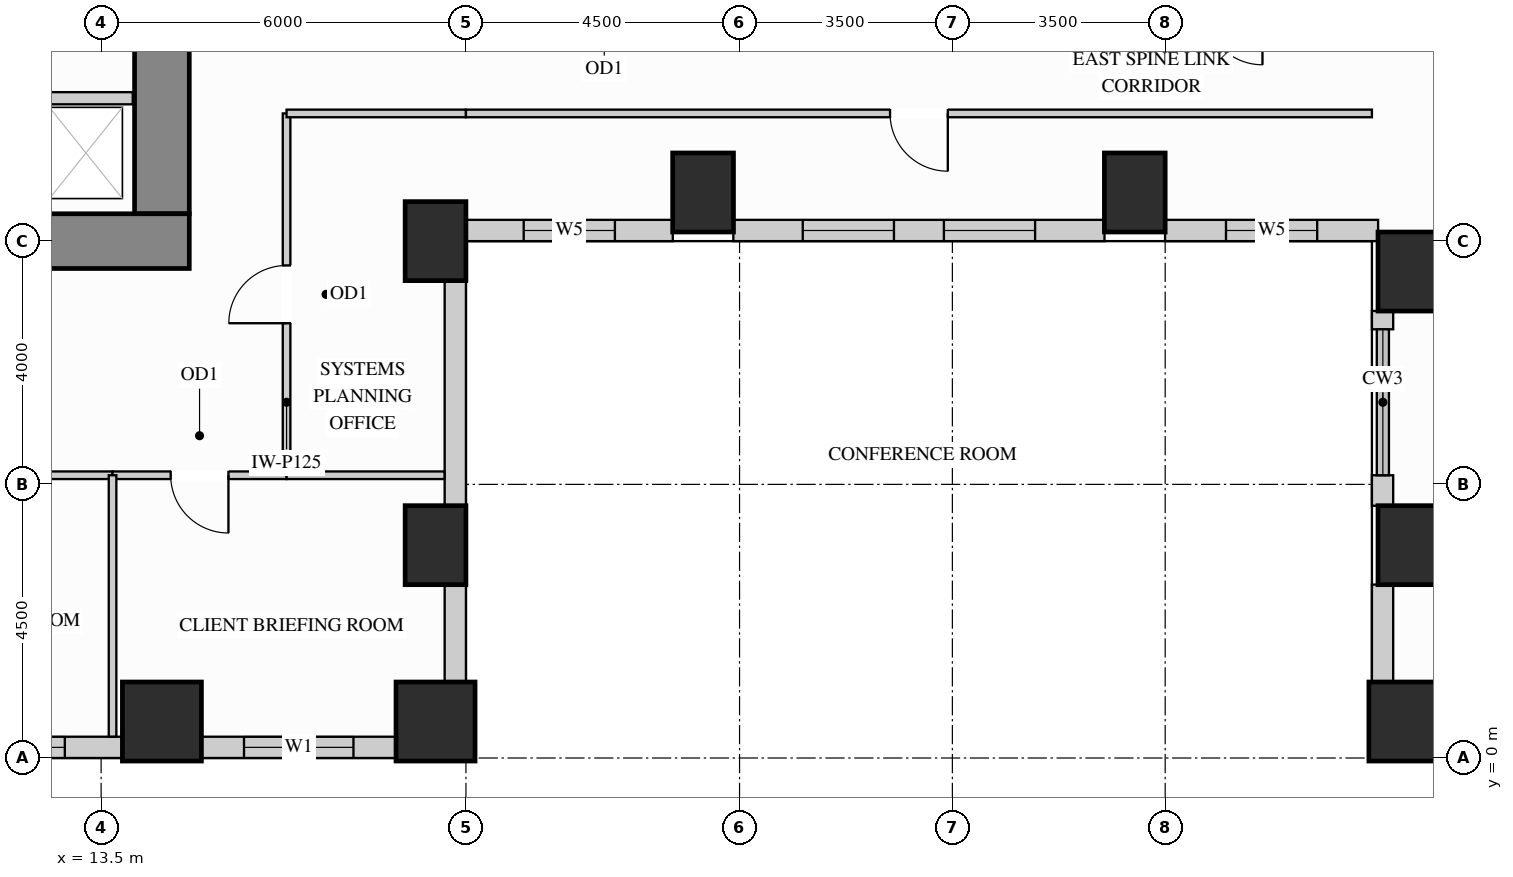
"""IFC4 building model, lengths in metres.
Left out: names, types, materials, properties, quantities, classifications, styles, units other than length and angle.
Written with IfcOpenShell. Run it as: python <this file> out.ifc"""

import sys

from ifc_helpers import new_model, si_unit, direction, frame, frame_2d, origin, origin_2d, place, context, subcontext, project, spatial, rectangle, extrude, source, transform, mapped, element, fill, save


model = new_model("IFC4")
c1 = context("Model", 3, precision=1e-05, world=origin(), true_north=direction((0.0, 1.0)))
c2 = subcontext(c1, "Body", "Model", "MODEL_VIEW")
j1 = project(units=[si_unit("LENGTHUNIT", "METRE"), si_unit("PLANEANGLEUNIT", "RADIAN")], contexts=[c1])
p1 = place(None, origin())
s1 = spatial("IfcSite", under=j1, at=p1, CompositionType="ELEMENT")
p2 = place(p1, origin())
s2 = spatial("IfcBuilding", under=s1, at=p2, CompositionType="ELEMENT")
p3 = place(p2, frame((0.0, 0.0, 44.1)))
s3 = spatial("IfcBuildingStorey", under=s2, at=p3, CompositionType="ELEMENT", Elevation=44.1)
m1 = source(origin(), c2, "Body", "SweptSolid", [
    extrude(rectangle(XDim=1.0, YDim=1.3, at=origin_2d()), origin(), (0.0, 0.0, 1.0), 3.38),
])
for number, where, z_axis, x_axis in (
    (1, (19.0, 3.5, 0.0), (0.0, 0.0, 1.0), (1.0, 0.0, 0.0)),
    (2, (19.0, 8.5, 0.0), (0.0, 0.0, 1.0), (1.0, 0.0, 0.0)),
    (3, (35.0, 3.5, 0.0), (0.0, 0.0, 1.0), (1.0, 0.0, 0.0)),
    (4, (35.0, 8.0, 0.0), (0.0, 0.0, 1.0), (1.0, 0.0, 0.0)),
    (5, (23.4, 9.3, 0.0), (0.0, 0.0, 1.0), (1.0, 0.0, 0.0)),
    (6, (30.5, 9.3, 0.0), (0.0, 0.0, 1.0), (1.0, 0.0, 0.0)),
):
    element("IfcColumn", number, at=place(p3, frame(where, z_axis=z_axis, x_axis=x_axis)), inside=s3, PredefinedType="COLUMN", context=c2, shape_type="MappedRepresentation", body=[
        mapped(m1, transform((0.0, 0.0, 0.0), x_axis=(1.0, 0.0, 0.0), y_axis=(0.0, 1.0, 0.0), z_axis=(0.0, 0.0, 1.0))),
    ])
m2 = source(origin(), c2, "Body", "SweptSolid", [
    extrude(rectangle(XDim=1.3, YDim=1.3, at=origin_2d()), origin(), (0.0, 0.0, 1.0), 3.38),
])
for number, where, z_axis, x_axis in (
    (7, (14.5, 0.6, 0.0), (0.0, 0.0, 1.0), (1.0, 0.0, 0.0)),
    (8, (19.0, 0.6, 0.0), (0.0, 0.0, 1.0), (1.0, 0.0, 0.0)),
    (9, (35.0, 0.6, 0.0), (0.0, 0.0, 1.0), (1.0, 0.0, 0.0)),
):
    element("IfcColumn", number, at=place(p3, frame(where, z_axis=z_axis, x_axis=x_axis)), inside=s3, PredefinedType="COLUMN", context=c2, shape_type="MappedRepresentation", body=[
        mapped(m2, transform((0.0, 0.0, 0.0), x_axis=(1.0, 0.0, 0.0), y_axis=(0.0, 1.0, 0.0), z_axis=(0.0, 0.0, 1.0))),
    ])
m3 = source(origin(), c2, "Body", "SweptSolid", [
    extrude(rectangle(XDim=9.87, YDim=0.9, at=frame_2d((4.935, 0.0))), origin(), (0.0, 0.0, 1.0), 3.38),
])
p4 = place(p3, frame((14.5, 8.95, 0.0), z_axis=(0.0, 0.0, 1.0), x_axis=(0.0, 1.0, 0.0)))
e10 = element("IfcWall", 10, at=p4, inside=s3, PredefinedType="SHEAR", context=c2, shape_type="MappedRepresentation", body=[
    mapped(m3, transform((0.0, 0.0, 0.0), x_axis=(1.0, 0.0, 0.0), y_axis=(0.0, 1.0, 0.0), z_axis=(0.0, 0.0, 1.0))),
])
m4 = source(origin(), c2, "Body", "SweptSolid", [
    extrude(rectangle(XDim=10.9, YDim=0.9, at=frame_2d((5.45, 0.0))), origin(), (0.0, 0.0, 1.0), 3.38),
])
p5 = place(p3, frame((4.05, 8.5, 0.0), z_axis=(0.0, 0.0, 1.0), x_axis=(1.0, 0.0, 0.0)))
e11 = element("IfcWall", 11, at=p5, inside=s3, PredefinedType="SHEAR", context=c2, shape_type="MappedRepresentation", body=[
    mapped(m4, transform((0.0, 0.0, 0.0), x_axis=(1.0, 0.0, 0.0), y_axis=(0.0, 1.0, 0.0), z_axis=(0.0, 0.0, 1.0))),
])
p6 = place(p3, frame((9.648, 0.175, 0.0), z_axis=(0.0, 0.0, 1.0), x_axis=(1.0, 0.0, 0.0)))
e12 = element("IfcWall", 12, at=p6, inside=s3, PredefinedType="SOLIDWALL", context=c2, shape_type="SweptSolid", body=[
    extrude(rectangle(XDim=4.204, YDim=0.35, at=frame_2d((2.102, 0.0))), origin(), (0.0, 0.0, 1.0), 2.51),
])
p7 = place(p6, frame((0.855, 0.0, 0.78)))
e13 = element("IfcOpeningElement", 13, at=p7, cuts=e12, PredefinedType="OPENING", context=c2, shape_type="SweptSolid", body=[
    extrude(rectangle(XDim=2.4, YDim=1.55, at=frame_2d((1.2, 0.775))), frame((0.0, 0.185, 0.0), z_axis=(0.0, -1.0, 0.0), x_axis=(1.0, 0.0, 0.0)), (0.0, 0.0, 1.0), 0.37),
])
p8 = place(p3, frame((15.148, 0.175, 0.0), z_axis=(0.0, 0.0, 1.0), x_axis=(1.0, 0.0, 0.0)))
e14 = element("IfcWall", 14, at=p8, inside=s3, PredefinedType="SOLIDWALL", context=c2, shape_type="SweptSolid", body=[
    extrude(rectangle(XDim=3.204, YDim=0.35, at=frame_2d((1.602, 0.0))), origin(), (0.0, 0.0, 1.0), 2.51),
])
p9 = place(p8, frame((0.702, 0.0, 0.78)))
e15 = element("IfcOpeningElement", 15, at=p9, cuts=e14, PredefinedType="OPENING", context=c2, shape_type="SweptSolid", body=[
    extrude(rectangle(XDim=1.8, YDim=1.55, at=frame_2d((0.9, 0.775))), frame((0.0, 0.185, 0.0), z_axis=(0.0, -1.0, 0.0), x_axis=(1.0, 0.0, 0.0)), (0.0, 0.0, 1.0), 0.37),
])
m5 = source(origin(), c2, "Body", "SweptSolid", [
    extrude(rectangle(XDim=1.604, YDim=0.35, at=frame_2d((0.802, 0.0))), origin(), (0.0, 0.0, 1.0), 2.51),
])
p10 = place(p3, frame((19.325, 1.248, 0.0), z_axis=(0.0, 0.0, 1.0), x_axis=(0.0, 1.0, 0.0)))
e16 = element("IfcWall", 16, at=p10, inside=s3, PredefinedType="SOLIDWALL", context=c2, shape_type="MappedRepresentation", body=[
    mapped(m5, transform((0.0, 0.0, 0.0), x_axis=(1.0, 0.0, 0.0), y_axis=(0.0, 1.0, 0.0), z_axis=(0.0, 0.0, 1.0))),
])
m6 = source(origin(), c2, "Body", "SweptSolid", [
    extrude(rectangle(XDim=3.704, YDim=0.35, at=frame_2d((1.852, 0.0))), origin(), (0.0, 0.0, 1.0), 2.51),
])
p11 = place(p3, frame((19.325, 4.148, 0.0), z_axis=(0.0, 0.0, 1.0), x_axis=(0.0, 1.0, 0.0)))
e17 = element("IfcWall", 17, at=p11, inside=s3, PredefinedType="SOLIDWALL", context=c2, shape_type="MappedRepresentation", body=[
    mapped(m6, transform((0.0, 0.0, 0.0), x_axis=(1.0, 0.0, 0.0), y_axis=(0.0, 1.0, 0.0), z_axis=(0.0, 0.0, 1.0))),
])
p12 = place(p3, frame((19.498, 8.675, 0.0), z_axis=(0.0, 0.0, 1.0), x_axis=(1.0, 0.0, 0.0)))
e18 = element("IfcWall", 18, at=p12, inside=s3, PredefinedType="SOLIDWALL", context=c2, shape_type="SweptSolid", body=[
    extrude(rectangle(XDim=3.404, YDim=0.35, at=frame_2d((1.702, 0.0))), origin(), (0.0, 0.0, 1.0), 3.365),
])
p13 = place(p12, frame((0.952, 0.0, 0.78)))
e19 = element("IfcOpeningElement", 19, at=p13, cuts=e18, PredefinedType="OPENING", context=c2, shape_type="SweptSolid", body=[
    extrude(rectangle(XDim=1.5, YDim=2.0, at=frame_2d((0.75, 1.0))), frame((0.0, 0.185, 0.0), z_axis=(0.0, -1.0, 0.0), x_axis=(1.0, 0.0, 0.0)), (0.0, 0.0, 1.0), 0.37),
])
p14 = place(p3, frame((23.898, 8.675, 0.0), z_axis=(0.0, 0.0, 1.0), x_axis=(1.0, 0.0, 0.0)))
e20 = element("IfcWall", 20, at=p14, inside=s3, PredefinedType="SOLIDWALL", context=c2, shape_type="SweptSolid", body=[
    extrude(rectangle(XDim=6.104, YDim=0.35, at=frame_2d((3.052, 0.0))), origin(), (0.0, 0.0, 1.0), 3.365),
])
p15 = place(p14, frame((1.141, 0.0, 0.78)))
e21 = element("IfcOpeningElement", 21, at=p15, cuts=e20, PredefinedType="OPENING", context=c2, shape_type="SweptSolid", body=[
    extrude(rectangle(XDim=1.5, YDim=2.0, at=frame_2d((0.75, 1.0))), frame((0.0, 0.185, 0.0), z_axis=(0.0, -1.0, 0.0), x_axis=(1.0, 0.0, 0.0)), (0.0, 0.0, 1.0), 0.37),
])
p16 = place(p14, frame((3.463, 0.0, 0.78)))
e22 = element("IfcOpeningElement", 22, at=p16, cuts=e20, PredefinedType="OPENING", context=c2, shape_type="SweptSolid", body=[
    extrude(rectangle(XDim=1.5, YDim=2.0, at=frame_2d((0.75, 1.0))), frame((0.0, 0.185, 0.0), z_axis=(0.0, -1.0, 0.0), x_axis=(1.0, 0.0, 0.0)), (0.0, 0.0, 1.0), 0.37),
])
p17 = place(p3, frame((30.998, 8.675, 0.0), z_axis=(0.0, 0.0, 1.0), x_axis=(1.0, 0.0, 0.0)))
e23 = element("IfcWall", 23, at=p17, inside=s3, PredefinedType="SOLIDWALL", context=c2, shape_type="SweptSolid", body=[
    extrude(rectangle(XDim=3.504, YDim=0.35, at=frame_2d((1.752, 0.0))), origin(), (0.0, 0.0, 1.0), 3.365),
])
p18 = place(p17, frame((1.002, 0.0, 0.78)))
e24 = element("IfcOpeningElement", 24, at=p18, cuts=e23, PredefinedType="OPENING", context=c2, shape_type="SweptSolid", body=[
    extrude(rectangle(XDim=1.5, YDim=2.0, at=frame_2d((0.75, 1.0))), frame((0.0, 0.185, 0.0), z_axis=(0.0, -1.0, 0.0), x_axis=(1.0, 0.0, 0.0)), (0.0, 0.0, 1.0), 0.37),
])
m7 = source(origin(), c2, "Body", "SweptSolid", [
    extrude(rectangle(XDim=0.302, YDim=0.35, at=frame_2d((0.151, 0.0))), origin(), (0.0, 0.0, 1.0), 2.51),
])
p19 = place(p3, frame((34.575, 7.352, 0.0), z_axis=(0.0, 0.0, 1.0), x_axis=(0.0, -1.0, 0.0)))
e25 = element("IfcWall", 25, at=p19, inside=s3, PredefinedType="SOLIDWALL", context=c2, shape_type="MappedRepresentation", body=[
    mapped(m7, transform((0.0, 0.0, 0.0), x_axis=(1.0, 0.0, 0.0), y_axis=(0.0, 1.0, 0.0), z_axis=(0.0, 0.0, 1.0))),
])
m8 = source(origin(), c2, "Body", "SweptSolid", [
    extrude(rectangle(XDim=0.502, YDim=0.35, at=frame_2d((0.251, 0.0))), origin(), (0.0, 0.0, 1.0), 2.51),
])
p20 = place(p3, frame((34.575, 4.65, 0.0), z_axis=(0.0, 0.0, 1.0), x_axis=(0.0, -1.0, 0.0)))
e26 = element("IfcWall", 26, at=p20, inside=s3, PredefinedType="SOLIDWALL", context=c2, shape_type="MappedRepresentation", body=[
    mapped(m8, transform((0.0, 0.0, 0.0), x_axis=(1.0, 0.0, 0.0), y_axis=(0.0, 1.0, 0.0), z_axis=(0.0, 0.0, 1.0))),
])
p21 = place(p3, frame((34.575, 2.852, 0.0), z_axis=(0.0, 0.0, 1.0), x_axis=(0.0, -1.0, 0.0)))
e27 = element("IfcWall", 27, at=p21, inside=s3, PredefinedType="SOLIDWALL", context=c2, shape_type="MappedRepresentation", body=[
    mapped(m5, transform((0.0, 0.0, 0.0), x_axis=(1.0, 0.0, 0.0), y_axis=(0.0, 1.0, 0.0), z_axis=(0.0, 0.0, 1.0))),
])
p22 = place(p3, frame((16.55, 4.65, 0.0), z_axis=(0.0, 0.0, 1.0), x_axis=(0.0, 1.0, 0.0)))
e28 = element("IfcWall", 28, at=p22, inside=s3, PredefinedType="PARTITIONING", context=c2, shape_type="SweptSolid", body=[
    extrude(rectangle(XDim=5.95, YDim=0.125, at=frame_2d((2.975, 0.0))), origin(), (0.0, 0.0, 1.0), 3.365),
])
p23 = place(p22, frame((2.5, 0.0, 0.0)))
e29 = element("IfcOpeningElement", 29, at=p23, cuts=e28, PredefinedType="OPENING", context=c2, shape_type="SweptSolid", body=[
    extrude(rectangle(XDim=0.95, YDim=2.15, at=frame_2d((0.475, 1.075))), frame((0.0, 0.073, 0.0), z_axis=(0.0, -1.0, 0.0), x_axis=(1.0, 0.0, 0.0)), (0.0, 0.0, 1.0), 0.145),
])
m9 = source(origin(), c2, "Body", "SweptSolid", [
    extrude(rectangle(XDim=2.95, YDim=0.125, at=frame_2d((1.475, 0.0))), origin(), (0.0, 0.0, 1.0), 3.365),
])
p24 = place(p3, frame((16.55, 10.6, 0.0), z_axis=(0.0, 0.0, 1.0), x_axis=(1.0, 0.0, 0.0)))
e30 = element("IfcWall", 30, at=p24, inside=s3, PredefinedType="PARTITIONING", context=c2, shape_type="MappedRepresentation", body=[
    mapped(m9, transform((0.0, 0.0, 0.0), x_axis=(1.0, 0.0, 0.0), y_axis=(0.0, 1.0, 0.0), z_axis=(0.0, 0.0, 1.0))),
])
p25 = place(p3, frame((19.5, 10.6, 0.0), z_axis=(0.0, 0.0, 1.0), x_axis=(1.0, 0.0, 0.0)))
e31 = element("IfcWall", 31, at=p25, inside=s3, PredefinedType="PARTITIONING", context=c2, shape_type="SweptSolid", body=[
    extrude(rectangle(XDim=14.9, YDim=0.125, at=frame_2d((7.45, 0.0))), origin(), (0.0, 0.0, 1.0), 3.365),
])
p26 = place(p25, frame((6.975, 0.0, 0.0)))
e32 = element("IfcOpeningElement", 32, at=p26, cuts=e31, PredefinedType="OPENING", context=c2, shape_type="SweptSolid", body=[
    extrude(rectangle(XDim=0.95, YDim=2.15, at=frame_2d((0.475, 1.075))), frame((0.0, 0.073, 0.0), z_axis=(0.0, -1.0, 0.0), x_axis=(1.0, 0.0, 0.0)), (0.0, 0.0, 1.0), 0.145),
])
p27 = place(p3, frame((7.896, 4.65, 0.0), z_axis=(0.0, 0.0, 1.0), x_axis=(1.0, 0.0, 0.0)))
e33 = element("IfcWall", 33, at=p27, inside=s3, PredefinedType="PARTITIONING", context=c2, shape_type="SweptSolid", body=[
    extrude(rectangle(XDim=5.792, YDim=0.125, at=frame_2d((2.896, 0.0))), origin(), (0.0, 0.0, 1.0), 2.828),
])
p28 = place(p27, frame((2.421, 0.0, 0.0)))
e34 = element("IfcOpeningElement", 34, at=p28, cuts=e33, PredefinedType="OPENING", context=c2, shape_type="SweptSolid", body=[
    extrude(rectangle(XDim=0.95, YDim=2.15, at=frame_2d((0.475, 1.075))), frame((0.0, 0.073, 0.0), z_axis=(0.0, -1.0, 0.0), x_axis=(1.0, 0.0, 0.0)), (0.0, 0.0, 1.0), 0.145),
])
p29 = place(p3, frame((13.688, 4.65, 0.0), z_axis=(0.0, 0.0, 1.0), x_axis=(1.0, 0.0, 0.0)))
e35 = element("IfcWall", 35, at=p29, inside=s3, PredefinedType="PARTITIONING", context=c2, shape_type="SweptSolid", body=[
    extrude(rectangle(XDim=2.862, YDim=0.125, at=frame_2d((1.431, 0.0))), origin(), (0.0, 0.0, 1.0), 2.828),
])
p30 = place(p29, frame((0.956, 0.0, 0.0)))
e36 = element("IfcOpeningElement", 36, at=p30, cuts=e35, PredefinedType="OPENING", context=c2, shape_type="SweptSolid", body=[
    extrude(rectangle(XDim=0.95, YDim=2.15, at=frame_2d((0.475, 1.075))), frame((0.0, 0.073, 0.0), z_axis=(0.0, -1.0, 0.0), x_axis=(1.0, 0.0, 0.0)), (0.0, 0.0, 1.0), 0.145),
])
m10 = source(origin(), c2, "Body", "SweptSolid", [
    extrude(rectangle(XDim=2.598, YDim=0.125, at=frame_2d((1.299, 0.0))), origin(), (0.0, 0.0, 1.0), 2.828),
])
p31 = place(p3, frame((16.55, 4.65, 0.0), z_axis=(0.0, 0.0, 1.0), x_axis=(1.0, 0.0, 0.0)))
e37 = element("IfcWall", 37, at=p31, inside=s3, PredefinedType="PARTITIONING", context=c2, shape_type="MappedRepresentation", body=[
    mapped(m10, transform((0.0, 0.0, 0.0), x_axis=(1.0, 0.0, 0.0), y_axis=(0.0, 1.0, 0.0), z_axis=(0.0, 0.0, 1.0))),
])
m11 = source(origin(), c2, "Body", "SweptSolid", [
    extrude(rectangle(XDim=4.298, YDim=0.125, at=frame_2d((2.149, 0.0))), origin(), (0.0, 0.0, 1.0), 3.365),
])
p32 = place(p3, frame((13.688, 0.352, 0.0), z_axis=(0.0, 0.0, 1.0), x_axis=(0.0, 1.0, 0.0)))
e38 = element("IfcWall", 38, at=p32, inside=s3, PredefinedType="PARTITIONING", context=c2, shape_type="MappedRepresentation", body=[
    mapped(m11, transform((0.0, 0.0, 0.0), x_axis=(1.0, 0.0, 0.0), y_axis=(0.0, 1.0, 0.0), z_axis=(0.0, 0.0, 1.0))),
])
m12 = source(origin(), c2, "Body", "SweptSolid", [
    extrude(rectangle(XDim=1.6, YDim=0.2, at=frame_2d((0.8, 0.0))), origin(), (0.0, 0.0, 1.0), 3.365),
])
p33 = place(p3, frame((12.42, 10.85, 0.0), z_axis=(0.0, 0.0, 1.0), x_axis=(1.0, 0.0, 0.0)))
e39 = element("IfcWall", 39, at=p33, inside=s3, PredefinedType="PARTITIONING", context=c2, shape_type="MappedRepresentation", body=[
    mapped(m12, transform((0.0, 0.0, 0.0), x_axis=(1.0, 0.0, 0.0), y_axis=(0.0, 1.0, 0.0), z_axis=(0.0, 0.0, 1.0))),
])
m13 = source(origin(), c2, "Body", "SweptSolid", [
    extrude(rectangle(XDim=0.95, YDim=2.15, at=frame_2d((0.475, 1.075))), frame((0.0, 0.025, 0.0), z_axis=(0.0, -1.0, 0.0), x_axis=(1.0, 0.0, 0.0)), (0.0, 0.0, 1.0), 0.05),
])
p34 = place(p23, origin())
e40 = element("IfcDoor", 40, at=p34, inside=s3, OperationType="SINGLE_SWING_LEFT", PredefinedType="DOOR", context=c2, shape_type="MappedRepresentation", body=[
    mapped(m13, transform((0.0, 0.0, 0.0), x_axis=(1.0, 0.0, 0.0), y_axis=(0.0, 1.0, 0.0), z_axis=(0.0, 0.0, 1.0))),
])
fill(e29, e40)
p35 = place(p30, origin())
e41 = element("IfcDoor", 41, at=p35, inside=s3, OperationType="SINGLE_SWING_RIGHT", PredefinedType="DOOR", context=c2, shape_type="MappedRepresentation", body=[
    mapped(m13, transform((0.0, 0.0, 0.0), x_axis=(1.0, 0.0, 0.0), y_axis=(0.0, 1.0, 0.0), z_axis=(0.0, 0.0, 1.0))),
])
fill(e36, e41)
p36 = place(p26, origin())
e42 = element("IfcDoor", 42, at=p36, inside=s3, OperationType="SINGLE_SWING_RIGHT", PredefinedType="DOOR", context=c2, shape_type="MappedRepresentation", body=[
    mapped(m13, transform((0.0, 0.0, 0.0), x_axis=(1.0, 0.0, 0.0), y_axis=(0.0, 1.0, 0.0), z_axis=(0.0, 0.0, 1.0))),
])
fill(e32, e42)
m14 = source(origin(), c2, "Body", "SweptSolid", [
    extrude(rectangle(XDim=1.8, YDim=1.55, at=frame_2d((0.9, 0.775))), frame((0.0, 0.03, 0.0), z_axis=(0.0, -1.0, 0.0), x_axis=(1.0, 0.0, 0.0)), (0.0, 0.0, 1.0), 0.06),
])
p37 = place(p9, origin())
e43 = element("IfcWindow", 43, at=p37, inside=s3, PartitioningType="SINGLE_PANEL", PredefinedType="WINDOW", context=c2, shape_type="MappedRepresentation", body=[
    mapped(m14, transform((0.0, 0.0, 0.0), x_axis=(1.0, 0.0, 0.0), y_axis=(0.0, 1.0, 0.0), z_axis=(0.0, 0.0, 1.0))),
])
fill(e15, e43)
m15 = source(origin(), c2, "Body", "SweptSolid", [
    extrude(rectangle(XDim=2.4, YDim=1.55, at=frame_2d((1.2, 0.775))), frame((0.0, 0.03, 0.0), z_axis=(0.0, -1.0, 0.0), x_axis=(1.0, 0.0, 0.0)), (0.0, 0.0, 1.0), 0.06),
])
p38 = place(p7, origin())
e44 = element("IfcWindow", 44, at=p38, inside=s3, PartitioningType="SINGLE_PANEL", PredefinedType="WINDOW", context=c2, shape_type="MappedRepresentation", body=[
    mapped(m15, transform((0.0, 0.0, 0.0), x_axis=(1.0, 0.0, 0.0), y_axis=(0.0, 1.0, 0.0), z_axis=(0.0, 0.0, 1.0))),
])
fill(e13, e44)
m16 = source(origin(), c2, "Body", "SweptSolid", [
    extrude(rectangle(XDim=1.5, YDim=2.0, at=frame_2d((0.75, 1.0))), frame((0.0, 0.03, 0.0), z_axis=(0.0, -1.0, 0.0), x_axis=(1.0, 0.0, 0.0)), (0.0, 0.0, 1.0), 0.06),
])
p39 = place(p13, origin())
e45 = element("IfcWindow", 45, at=p39, inside=s3, PartitioningType="SINGLE_PANEL", PredefinedType="WINDOW", context=c2, shape_type="MappedRepresentation", body=[
    mapped(m16, transform((0.0, 0.0, 0.0), x_axis=(1.0, 0.0, 0.0), y_axis=(0.0, 1.0, 0.0), z_axis=(0.0, 0.0, 1.0))),
])
fill(e19, e45)
p40 = place(p15, origin())
e46 = element("IfcWindow", 46, at=p40, inside=s3, PartitioningType="SINGLE_PANEL", PredefinedType="WINDOW", context=c2, shape_type="MappedRepresentation", body=[
    mapped(m16, transform((0.0, 0.0, 0.0), x_axis=(1.0, 0.0, 0.0), y_axis=(0.0, 1.0, 0.0), z_axis=(0.0, 0.0, 1.0))),
])
fill(e21, e46)
p41 = place(p16, origin())
e47 = element("IfcWindow", 47, at=p41, inside=s3, PartitioningType="SINGLE_PANEL", PredefinedType="WINDOW", context=c2, shape_type="MappedRepresentation", body=[
    mapped(m16, transform((0.0, 0.0, 0.0), x_axis=(1.0, 0.0, 0.0), y_axis=(0.0, 1.0, 0.0), z_axis=(0.0, 0.0, 1.0))),
])
fill(e22, e47)
p42 = place(p18, origin())
e48 = element("IfcWindow", 48, at=p42, inside=s3, PartitioningType="SINGLE_PANEL", PredefinedType="WINDOW", context=c2, shape_type="MappedRepresentation", body=[
    mapped(m16, transform((0.0, 0.0, 0.0), x_axis=(1.0, 0.0, 0.0), y_axis=(0.0, 1.0, 0.0), z_axis=(0.0, 0.0, 1.0))),
])
fill(e24, e48)
save(model, sys.argv[1])
